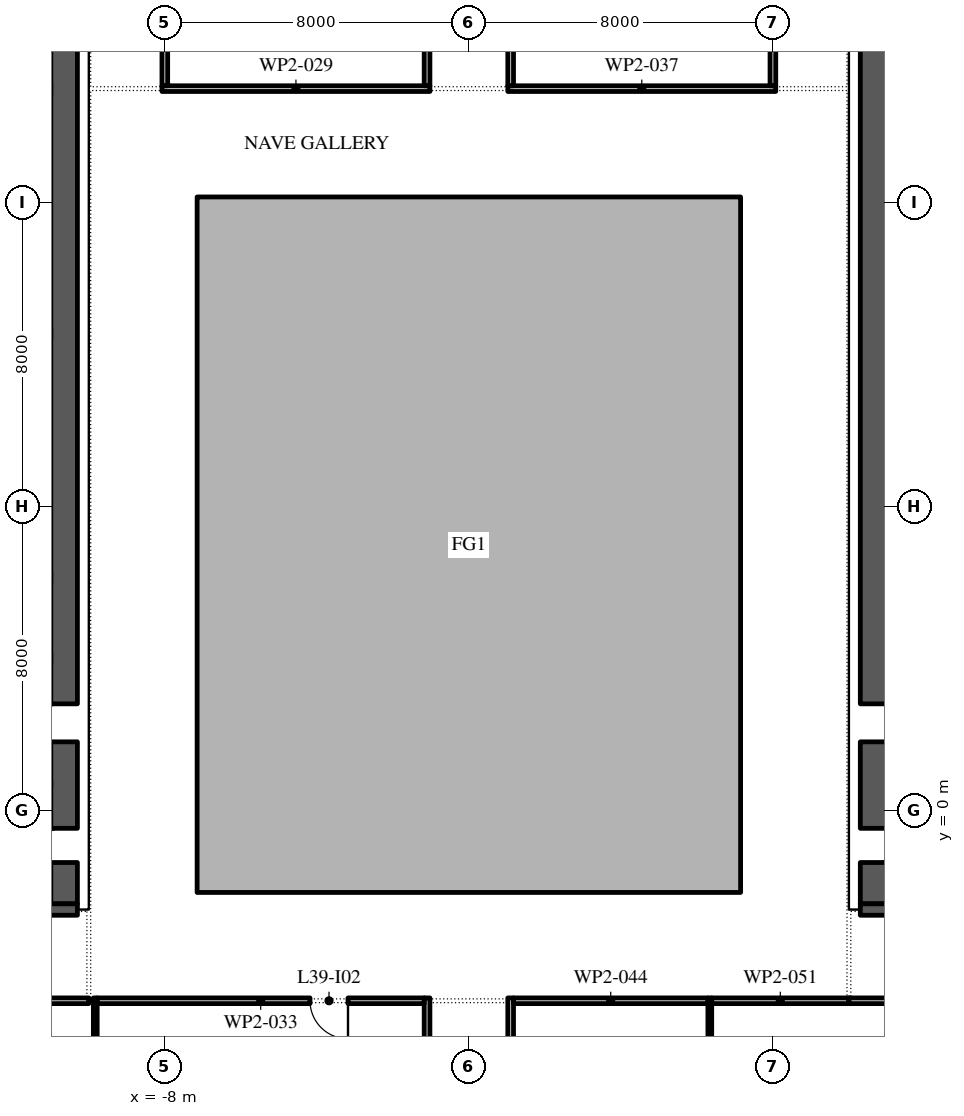
"""IFC4 building model, lengths in metres.
Left out: names, types, materials, properties, quantities, classifications, styles, units other than length and angle.
Written with IfcOpenShell. Run it as: python <this file> out.ifc"""

import sys

from ifc_helpers import new_model, si_unit, direction, frame, frame_2d, origin, place, context, subcontext, project, spatial, polyline, rectangle, outline, extrude, element, fill, save


model = new_model("IFC4")
c1 = context("Model", 3, precision=1e-05, world=origin(), true_north=direction((0.0, 1.0)))
c2 = subcontext(c1, "Body", "Model", "MODEL_VIEW")
j1 = project(units=[si_unit("LENGTHUNIT", "METRE"), si_unit("PLANEANGLEUNIT", "RADIAN")], contexts=[c1])
p1 = place(None, origin())
s1 = spatial("IfcSite", under=j1, at=p1, CompositionType="ELEMENT")
p2 = place(p1, origin())
s2 = spatial("IfcBuilding", under=s1, at=p2, CompositionType="ELEMENT")
p3 = place(p2, frame((0.0, 0.0, 180.0)))
s3 = spatial("IfcBuildingStorey", under=s2, at=p3, CompositionType="ELEMENT", Elevation=180.0)
p4 = place(p3, origin())
e1 = element("IfcWall", 1, at=p4, inside=s3, PredefinedType="STANDARD", context=c2, shape_type="SweptSolid", body=[
    extrude(outline(polyline([(-7.15, -2.15), (7.15, -2.15), (7.15, 16.15), (-7.15, 16.15), (-7.15, -2.15)]), holes=[polyline([(-7.0, -2.0), (-7.0, 16.0), (7.0, 16.0), (7.0, -2.0), (-7.0, -2.0)])]), origin(), (0.0, 0.0, 1.0), 4.0),
])
p5 = place(p3, frame((-10.65, -2.45, 0.0), z_axis=(0.0, 0.0, 1.0), x_axis=(0.0, 1.0, 0.0)))
e2 = element("IfcWall", 2, at=p5, inside=s3, PredefinedType="SHEAR", context=c2, shape_type="SweptSolid", body=[
    extrude(rectangle(XDim=27.9, YDim=0.7, at=frame_2d((13.95, 0.0))), origin(), (0.0, 0.0, 1.0), 4.0),
])
p6 = place(p5, frame((23.65, 0.0, 0.0)))
e3 = element("IfcOpeningElement", 3, at=p6, cuts=e2, PredefinedType="OPENING", context=c2, shape_type="SweptSolid", body=[
    extrude(rectangle(XDim=2.4, YDim=2.1, at=frame_2d((1.2, 1.05))), frame((0.0, 0.36, 0.0), z_axis=(0.0, -1.0, 0.0), x_axis=(1.0, 0.0, 0.0)), (0.0, 0.0, 1.0), 0.72),
])
p7 = place(p5, frame((1.087, 0.0, 0.0)))
e4 = element("IfcOpeningElement", 4, at=p7, cuts=e2, PredefinedType="OPENING", context=c2, shape_type="SweptSolid", body=[
    extrude(rectangle(XDim=0.9, YDim=2.1, at=frame_2d((0.45, 1.05))), frame((0.0, 0.36, 0.0), z_axis=(0.0, -1.0, 0.0), x_axis=(1.0, 0.0, 0.0)), (0.0, 0.0, 1.0), 0.72),
])
p8 = place(p5, frame((4.262, 0.0, 0.0)))
e5 = element("IfcOpeningElement", 5, at=p8, cuts=e2, PredefinedType="OPENING", context=c2, shape_type="SweptSolid", body=[
    extrude(rectangle(XDim=1.0, YDim=2.1, at=frame_2d((0.5, 1.05))), frame((0.0, 0.36, 0.0), z_axis=(0.0, -1.0, 0.0), x_axis=(1.0, 0.0, 0.0)), (0.0, 0.0, 1.0), 0.72),
])
p9 = place(p3, frame((-21.7, -2.6, 0.0), z_axis=(0.0, 0.0, 1.0), x_axis=(1.0, 0.0, 0.0)))
e6 = element("IfcWall", 6, at=p9, inside=s3, PredefinedType="SHEAR", context=c2, shape_type="SweptSolid", body=[
    extrude(rectangle(XDim=11.4, YDim=0.3, at=frame_2d((5.7, 0.0))), origin(), (0.0, 0.0, 1.0), 4.0),
])
p10 = place(p3, frame((10.65, -2.45, 0.0), z_axis=(0.0, 0.0, 1.0), x_axis=(0.0, 1.0, 0.0)))
e7 = element("IfcWall", 7, at=p10, inside=s3, PredefinedType="SHEAR", context=c2, shape_type="SweptSolid", body=[
    extrude(rectangle(XDim=27.9, YDim=0.7, at=frame_2d((13.95, 0.0))), origin(), (0.0, 0.0, 1.0), 4.0),
])
p11 = place(p10, frame((23.65, 0.0, 0.0)))
e8 = element("IfcOpeningElement", 8, at=p11, cuts=e7, PredefinedType="OPENING", context=c2, shape_type="SweptSolid", body=[
    extrude(rectangle(XDim=2.4, YDim=2.1, at=frame_2d((1.2, 1.05))), frame((0.0, 0.36, 0.0), z_axis=(0.0, -1.0, 0.0), x_axis=(1.0, 0.0, 0.0)), (0.0, 0.0, 1.0), 0.72),
])
p12 = place(p10, frame((1.087, 0.0, 0.0)))
e9 = element("IfcOpeningElement", 9, at=p12, cuts=e7, PredefinedType="OPENING", context=c2, shape_type="SweptSolid", body=[
    extrude(rectangle(XDim=0.9, YDim=2.1, at=frame_2d((0.45, 1.05))), frame((0.0, 0.36, 0.0), z_axis=(0.0, -1.0, 0.0), x_axis=(1.0, 0.0, 0.0)), (0.0, 0.0, 1.0), 0.72),
])
p13 = place(p10, frame((4.262, 0.0, 0.0)))
e10 = element("IfcOpeningElement", 10, at=p13, cuts=e7, PredefinedType="OPENING", context=c2, shape_type="SweptSolid", body=[
    extrude(rectangle(XDim=1.0, YDim=2.1, at=frame_2d((0.5, 1.05))), frame((0.0, 0.36, 0.0), z_axis=(0.0, -1.0, 0.0), x_axis=(1.0, 0.0, 0.0)), (0.0, 0.0, 1.0), 0.72),
])
p14 = place(p3, frame((10.3, -2.6, 0.0), z_axis=(0.0, 0.0, 1.0), x_axis=(1.0, 0.0, 0.0)))
e11 = element("IfcWall", 11, at=p14, inside=s3, PredefinedType="SHEAR", context=c2, shape_type="SweptSolid", body=[
    extrude(rectangle(XDim=11.4, YDim=0.3, at=frame_2d((5.7, 0.0))), origin(), (0.0, 0.0, 1.0), 4.0),
])
p15 = place(p3, frame((-10.0, -5.0, 0.0), z_axis=(0.0, 0.0, 1.0), x_axis=(-1.0, 0.0, 0.0)))
e12 = element("IfcWall", 12, at=p15, inside=s3, PredefinedType="PARTITIONING", context=c2, shape_type="SweptSolid", body=[
    extrude(rectangle(XDim=13.925, YDim=0.15, at=frame_2d((6.962, 0.0))), origin(), (0.0, 0.0, 1.0), 4.0),
])
p16 = place(p15, frame((7.85, 0.0, 0.0)))
e13 = element("IfcOpeningElement", 13, at=p16, cuts=e12, PredefinedType="OPENING", context=c2, shape_type="SweptSolid", body=[
    extrude(rectangle(XDim=1.0, YDim=2.1, at=frame_2d((0.5, 1.05))), frame((0.0, 0.085, 0.0), z_axis=(0.0, -1.0, 0.0), x_axis=(1.0, 0.0, 0.0)), (0.0, 0.0, 1.0), 0.17),
])
p17 = place(p3, frame((-9.83, -11.12, 0.0), z_axis=(0.0, 0.0, 1.0), x_axis=(0.0, 1.0, 0.0)))
e14 = element("IfcWall", 14, at=p17, inside=s3, PredefinedType="PARTITIONING", context=c2, shape_type="SweptSolid", body=[
    extrude(rectangle(XDim=6.195, YDim=0.1, at=frame_2d((3.098, 0.0))), origin(), (0.0, 0.0, 1.0), 4.0),
])
p18 = place(p3, frame((-8.075, 19.0, 0.0), z_axis=(0.0, 0.0, 1.0), x_axis=(1.0, 0.0, 0.0)))
e15 = element("IfcWall", 15, at=p18, inside=s3, PredefinedType="PARTITIONING", context=c2, shape_type="SweptSolid", body=[
    extrude(rectangle(XDim=7.05, YDim=0.15, at=frame_2d((3.525, 0.0))), origin(), (0.0, 0.0, 1.0), 4.0),
])
p19 = place(p3, frame((-8.0, 27.325, 0.0), z_axis=(0.0, 0.0, 1.0), x_axis=(0.0, -1.0, 0.0)))
e16 = element("IfcWall", 16, at=p19, inside=s3, PredefinedType="PARTITIONING", context=c2, shape_type="SweptSolid", body=[
    extrude(rectangle(XDim=8.25, YDim=0.15, at=frame_2d((4.125, 0.0))), origin(), (0.0, 0.0, 1.0), 4.0),
])
p20 = place(p3, frame((-1.1, -11.12, 0.0), z_axis=(0.0, 0.0, 1.0), x_axis=(0.0, 1.0, 0.0)))
e17 = element("IfcWall", 17, at=p20, inside=s3, PredefinedType="PARTITIONING", context=c2, shape_type="SweptSolid", body=[
    extrude(rectangle(XDim=6.195, YDim=0.15, at=frame_2d((3.098, 0.0))), origin(), (0.0, 0.0, 1.0), 4.0),
])
p21 = place(p3, frame((-1.175, -5.0, 0.0), z_axis=(0.0, 0.0, 1.0), x_axis=(-1.0, 0.0, 0.0)))
e18 = element("IfcWall", 18, at=p21, inside=s3, PredefinedType="PARTITIONING", context=c2, shape_type="SweptSolid", body=[
    extrude(rectangle(XDim=8.605, YDim=0.15, at=frame_2d((4.302, 0.0))), origin(), (0.0, 0.0, 1.0), 4.0),
])
p22 = place(p21, frame((2.005, 0.0, 0.0)))
e19 = element("IfcOpeningElement", 19, at=p22, cuts=e18, PredefinedType="OPENING", context=c2, shape_type="SweptSolid", body=[
    extrude(rectangle(XDim=1.0, YDim=2.1, at=frame_2d((0.5, 1.05))), frame((0.0, 0.085, 0.0), z_axis=(0.0, -1.0, 0.0), x_axis=(1.0, 0.0, 0.0)), (0.0, 0.0, 1.0), 0.17),
])
p23 = place(p3, frame((-1.1, 19.075, 0.0), z_axis=(0.0, 0.0, 1.0), x_axis=(0.0, 1.0, 0.0)))
e20 = element("IfcWall", 20, at=p23, inside=s3, PredefinedType="PARTITIONING", context=c2, shape_type="SweptSolid", body=[
    extrude(rectangle(XDim=11.295, YDim=0.15, at=frame_2d((5.647, 0.0))), origin(), (0.0, 0.0, 1.0), 4.0),
])
p24 = place(p23, frame((6.195, 0.0, 0.0)))
e21 = element("IfcOpeningElement", 21, at=p24, cuts=e20, PredefinedType="OPENING", context=c2, shape_type="SweptSolid", body=[
    extrude(rectangle(XDim=1.0, YDim=2.1, at=frame_2d((0.5, 1.05))), frame((0.0, 0.085, 0.0), z_axis=(0.0, -1.0, 0.0), x_axis=(1.0, 0.0, 0.0)), (0.0, 0.0, 1.0), 0.17),
])
p25 = place(p3, frame((1.1, -4.925, 0.0), z_axis=(0.0, 0.0, 1.0), x_axis=(0.0, -1.0, 0.0)))
e22 = element("IfcWall", 22, at=p25, inside=s3, PredefinedType="PARTITIONING", context=c2, shape_type="SweptSolid", body=[
    extrude(rectangle(XDim=11.345, YDim=0.15, at=frame_2d((5.672, 0.0))), origin(), (0.0, 0.0, 1.0), 4.0),
])
p26 = place(p25, frame((7.675, 0.0, 0.0)))
e23 = element("IfcOpeningElement", 23, at=p26, cuts=e22, PredefinedType="OPENING", context=c2, shape_type="SweptSolid", body=[
    extrude(rectangle(XDim=1.0, YDim=2.1, at=frame_2d((0.5, 1.05))), frame((0.0, 0.085, 0.0), z_axis=(0.0, -1.0, 0.0), x_axis=(1.0, 0.0, 0.0)), (0.0, 0.0, 1.0), 0.17),
])
p27 = place(p3, frame((1.025, 19.0, 0.0), z_axis=(0.0, 0.0, 1.0), x_axis=(1.0, 0.0, 0.0)))
e24 = element("IfcWall", 24, at=p27, inside=s3, PredefinedType="PARTITIONING", context=c2, shape_type="SweptSolid", body=[
    extrude(rectangle(XDim=7.05, YDim=0.15, at=frame_2d((3.525, 0.0))), origin(), (0.0, 0.0, 1.0), 4.0),
])
p28 = place(p3, frame((1.1, 30.47, 0.0), z_axis=(0.0, 0.0, 1.0), x_axis=(0.0, -1.0, 0.0)))
e25 = element("IfcWall", 25, at=p28, inside=s3, PredefinedType="PARTITIONING", context=c2, shape_type="SweptSolid", body=[
    extrude(rectangle(XDim=11.395, YDim=0.15, at=frame_2d((5.698, 0.0))), origin(), (0.0, 0.0, 1.0), 4.0),
])
p29 = place(p28, frame((4.07, 0.0, 0.0)))
e26 = element("IfcOpeningElement", 26, at=p29, cuts=e25, PredefinedType="OPENING", context=c2, shape_type="SweptSolid", body=[
    extrude(rectangle(XDim=1.0, YDim=2.1, at=frame_2d((0.5, 1.05))), frame((0.0, 0.085, 0.0), z_axis=(0.0, -1.0, 0.0), x_axis=(1.0, 0.0, 0.0)), (0.0, 0.0, 1.0), 0.17),
])
p30 = place(p3, frame((6.34, -15.061, 0.0), z_axis=(0.0, 0.0, 1.0), x_axis=(0.0, 1.0, 0.0)))
e27 = element("IfcWall", 27, at=p30, inside=s3, PredefinedType="PARTITIONING", context=c2, shape_type="SweptSolid", body=[
    extrude(rectangle(XDim=10.136, YDim=0.1, at=frame_2d((5.068, 0.0))), origin(), (0.0, 0.0, 1.0), 4.0),
])
p31 = place(p3, frame((6.29, -5.0, 0.0), z_axis=(0.0, 0.0, 1.0), x_axis=(-1.0, 0.0, 0.0)))
e28 = element("IfcWall", 28, at=p31, inside=s3, PredefinedType="PARTITIONING", context=c2, shape_type="SweptSolid", body=[
    extrude(rectangle(XDim=5.115, YDim=0.15, at=frame_2d((2.558, 0.0))), origin(), (0.0, 0.0, 1.0), 4.0),
])
p32 = place(p3, frame((8.0, 19.075, 0.0), z_axis=(0.0, 0.0, 1.0), x_axis=(0.0, 1.0, 0.0)))
e29 = element("IfcWall", 29, at=p32, inside=s3, PredefinedType="PARTITIONING", context=c2, shape_type="SweptSolid", body=[
    extrude(rectangle(XDim=8.4, YDim=0.15, at=frame_2d((4.2, 0.0))), origin(), (0.0, 0.0, 1.0), 4.0),
])
p33 = place(p3, frame((10.0, -5.0, 0.0), z_axis=(0.0, 0.0, 1.0), x_axis=(-1.0, 0.0, 0.0)))
e30 = element("IfcWall", 30, at=p33, inside=s3, PredefinedType="PARTITIONING", context=c2, shape_type="SweptSolid", body=[
    extrude(rectangle(XDim=3.61, YDim=0.15, at=frame_2d((1.805, 0.0))), origin(), (0.0, 0.0, 1.0), 4.0),
])
p34 = place(p3, frame((14.38, -5.0, 0.0), z_axis=(0.0, 0.0, 1.0), x_axis=(-1.0, 0.0, 0.0)))
e31 = element("IfcWall", 31, at=p34, inside=s3, PredefinedType="PARTITIONING", context=c2, shape_type="SweptSolid", body=[
    extrude(rectangle(XDim=4.38, YDim=0.15, at=frame_2d((2.19, 0.0))), origin(), (0.0, 0.0, 1.0), 4.0),
])
p35 = place(p34, frame((1.73, 0.0, 0.0)))
e32 = element("IfcOpeningElement", 32, at=p35, cuts=e31, PredefinedType="OPENING", context=c2, shape_type="SweptSolid", body=[
    extrude(rectangle(XDim=1.0, YDim=2.1, at=frame_2d((0.5, 1.05))), frame((0.0, 0.085, 0.0), z_axis=(0.0, -1.0, 0.0), x_axis=(1.0, 0.0, 0.0)), (0.0, 0.0, 1.0), 0.17),
])
p36 = place(p22, origin())
e33 = element("IfcDoor", 33, at=p36, inside=s3, OperationType="SINGLE_SWING_RIGHT", PredefinedType="DOOR", context=c2, shape_type="SweptSolid", body=[
    extrude(rectangle(XDim=1.0, YDim=2.1, at=frame_2d((0.5, 1.05))), frame((0.0, 0.025, 0.0), z_axis=(0.0, -1.0, 0.0), x_axis=(1.0, 0.0, 0.0)), (0.0, 0.0, 1.0), 0.05),
])
fill(e19, e33)
save(model, sys.argv[1])
